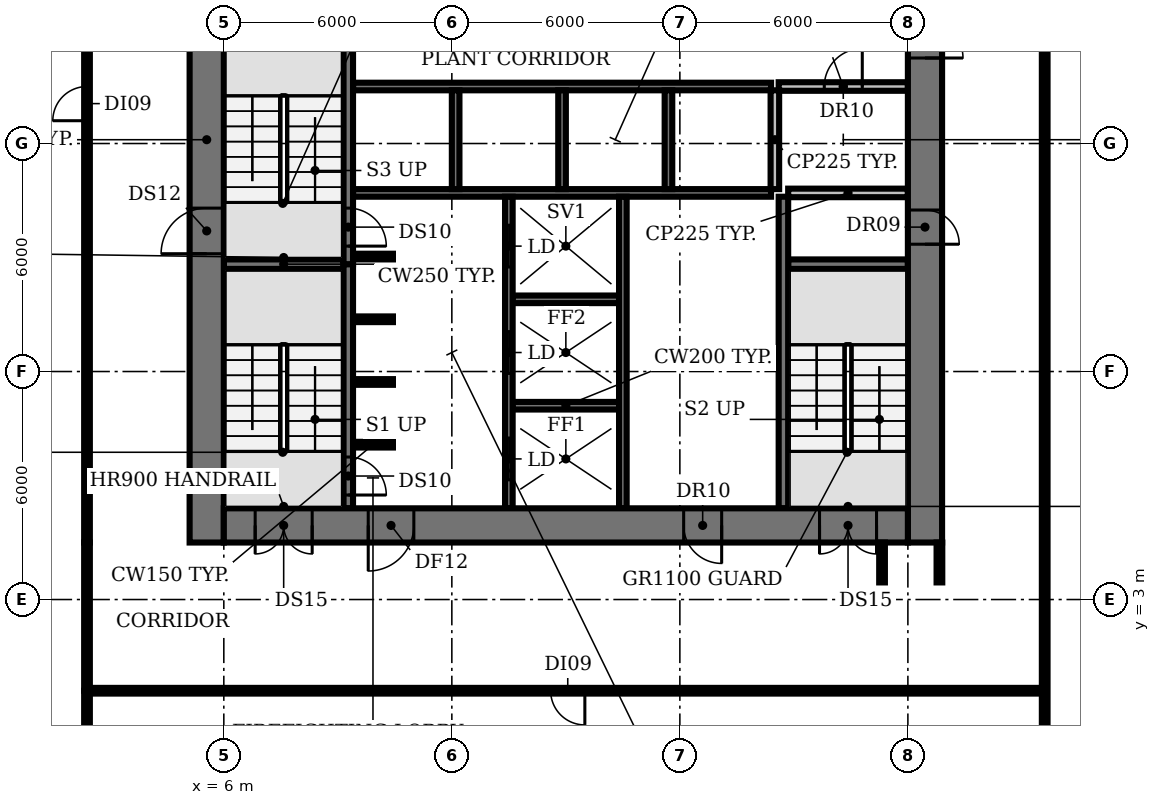
"""IFC4 building model, lengths in metres.
Left out: names, types, materials, properties, quantities, classifications, styles, units other than length and angle.
Written with IfcOpenShell. Run it as: python <this file> out.ifc"""

import sys

from ifc_helpers import new_model, si_unit, direction, frame, frame_2d, origin, place, context, subcontext, project, spatial, rectangle, extrude, element, fill, save


model = new_model("IFC4")
c1 = context("Model", 3, precision=1e-05, world=origin(), true_north=direction((0.0, 1.0)))
c2 = subcontext(c1, "Body", "Model", "MODEL_VIEW")
j1 = project(units=[si_unit("LENGTHUNIT", "METRE"), si_unit("PLANEANGLEUNIT", "RADIAN")], contexts=[c1])
p1 = place(None, origin())
s1 = spatial("IfcSite", under=j1, at=p1, CompositionType="ELEMENT")
p2 = place(p1, origin())
s2 = spatial("IfcBuilding", under=s1, at=p2, CompositionType="ELEMENT")
p3 = place(p2, frame((0.0, 0.0, -6.0)))
s3 = spatial("IfcBuildingStorey", under=s2, at=p3, CompositionType="ELEMENT", Elevation=-6.0)
p4 = place(p3, frame((9.4, 7.075, 0.0), z_axis=(0.0, 0.0, 1.0), x_axis=(1.0, 0.0, 0.0)))
e1 = element("IfcWall", 1, at=p4, inside=s3, PredefinedType="SHEAR", context=c2, shape_type="SweptSolid", body=[
    extrude(rectangle(XDim=1.05, YDim=0.15, at=frame_2d((0.525, 0.0))), origin(), (0.0, 0.0, 1.0), 5.65),
])
p5 = place(p3, frame((13.6, 8.1, 0.0), z_axis=(0.0, 0.0, 1.0), x_axis=(1.0, 0.0, 0.0)))
e2 = element("IfcWall", 2, at=p5, inside=s3, PredefinedType="SHEAR", context=c2, shape_type="SweptSolid", body=[
    extrude(rectangle(XDim=2.8, YDim=0.2, at=frame_2d((1.4, 0.0))), origin(), (0.0, 0.0, 1.0), 5.65),
])
for number, where, z_axis, x_axis in (
    (3, (9.4, 8.725, 0.0), (0.0, 0.0, 1.0), (1.0, 0.0, 0.0)),
    (4, (9.4, 10.375, 0.0), (0.0, 0.0, 1.0), (1.0, 0.0, 0.0)),
):
    element("IfcWall", number, at=place(p3, frame(where, z_axis=z_axis, x_axis=x_axis)), inside=s3, PredefinedType="SHEAR", context=c2, shape_type="SweptSolid", body=[
        extrude(rectangle(XDim=1.05, YDim=0.15, at=frame_2d((0.525, 0.0))), origin(), (0.0, 0.0, 1.0), 5.65),
    ])
p6 = place(p3, frame((13.6, 10.9, 0.0), z_axis=(0.0, 0.0, 1.0), x_axis=(1.0, 0.0, 0.0)))
e5 = element("IfcWall", 5, at=p6, inside=s3, PredefinedType="SHEAR", context=c2, shape_type="SweptSolid", body=[
    extrude(rectangle(XDim=2.8, YDim=0.2, at=frame_2d((1.4, 0.0))), origin(), (0.0, 0.0, 1.0), 5.65),
])
for number, where, z_axis, x_axis in (
    (6, (6.0, 11.825, 0.0), (0.0, 0.0, 1.0), (1.0, 0.0, 0.0)),
    (7, (20.85, 11.825, 0.0), (0.0, 0.0, 1.0), (1.0, 0.0, 0.0)),
):
    element("IfcWall", number, at=place(p3, frame(where, z_axis=z_axis, x_axis=x_axis)), inside=s3, PredefinedType="SHEAR", context=c2, shape_type="SweptSolid", body=[
        extrude(rectangle(XDim=3.15, YDim=0.25, at=frame_2d((1.575, 0.0))), origin(), (0.0, 0.0, 1.0), 5.65),
    ])
p7 = place(p3, frame((9.4, 12.025, 0.0), z_axis=(0.0, 0.0, 1.0), x_axis=(1.0, 0.0, 0.0)))
e8 = element("IfcWall", 8, at=p7, inside=s3, PredefinedType="SHEAR", context=c2, shape_type="SweptSolid", body=[
    extrude(rectangle(XDim=1.05, YDim=0.15, at=frame_2d((0.525, 0.0))), origin(), (0.0, 0.0, 1.0), 5.65),
])
p8 = place(p3, frame((9.4, 13.7, 0.0), z_axis=(0.0, 0.0, 1.0), x_axis=(1.0, 0.0, 0.0)))
e9 = element("IfcWall", 9, at=p8, inside=s3, PredefinedType="SHEAR", context=c2, shape_type="SweptSolid", body=[
    extrude(rectangle(XDim=11.0, YDim=0.2, at=frame_2d((5.5, 0.0))), origin(), (0.0, 0.0, 1.0), 5.65),
])
p9 = place(p3, frame((20.85, 13.7, 0.0), z_axis=(0.0, 0.0, 1.0), x_axis=(1.0, 0.0, 0.0)))
e10 = element("IfcWall", 10, at=p9, inside=s3, PredefinedType="PARTITIONING", context=c2, shape_type="SweptSolid", body=[
    extrude(rectangle(XDim=3.15, YDim=0.225, at=frame_2d((1.575, 0.0))), origin(), (0.0, 0.0, 1.0), 5.65),
])
p10 = place(p3, frame((9.4, 16.5, 0.0), z_axis=(0.0, 0.0, 1.0), x_axis=(1.0, 0.0, 0.0)))
e11 = element("IfcWall", 11, at=p10, inside=s3, PredefinedType="SHEAR", context=c2, shape_type="SweptSolid", body=[
    extrude(rectangle(XDim=11.0, YDim=0.2, at=frame_2d((5.5, 0.0))), origin(), (0.0, 0.0, 1.0), 5.65),
])
p11 = place(p3, frame((20.6, 16.5, 0.0), z_axis=(0.0, 0.0, 1.0), x_axis=(1.0, 0.0, 0.0)))
e12 = element("IfcWall", 12, at=p11, inside=s3, PredefinedType="PARTITIONING", context=c2, shape_type="SweptSolid", body=[
    extrude(rectangle(XDim=3.4, YDim=0.225, at=frame_2d((1.7, 0.0))), origin(), (0.0, 0.0, 1.0), 5.65),
])
p12 = place(p11, frame((1.2, 0.0, 0.0)))
e13 = element("IfcOpeningElement", 13, at=p12, cuts=e12, PredefinedType="OPENING", context=c2, shape_type="SweptSolid", body=[
    extrude(rectangle(XDim=1.0, YDim=2.1, at=frame_2d((0.5, 1.05))), frame((0.0, 0.123, 0.0), z_axis=(0.0, -1.0, 0.0), x_axis=(1.0, 0.0, 0.0)), (0.0, 0.0, 1.0), 0.245),
])
p13 = place(p3, frame((9.275, 11.825, 0.0), z_axis=(0.0, 0.0, 1.0), x_axis=(0.0, -1.0, 0.0)))
e14 = element("IfcWall", 14, at=p13, inside=s3, PredefinedType="SHEAR", context=c2, shape_type="SweptSolid", body=[
    extrude(rectangle(XDim=6.425, YDim=0.25, at=frame_2d((3.212, 0.0))), origin(), (0.0, 0.0, 1.0), 5.65),
])
p14 = place(p13, frame((5.075, 0.0, 0.0)))
e15 = element("IfcOpeningElement", 15, at=p14, cuts=e14, PredefinedType="OPENING", context=c2, shape_type="SweptSolid", body=[
    extrude(rectangle(XDim=1.0, YDim=2.1, at=frame_2d((0.5, 1.05))), frame((0.0, 0.135, 0.0), z_axis=(0.0, -1.0, 0.0), x_axis=(1.0, 0.0, 0.0)), (0.0, 0.0, 1.0), 0.27),
])
p15 = place(p3, frame((9.275, 18.375, 0.0), z_axis=(0.0, 0.0, 1.0), x_axis=(0.0, -1.0, 0.0)))
e16 = element("IfcWall", 16, at=p15, inside=s3, PredefinedType="SHEAR", context=c2, shape_type="SweptSolid", body=[
    extrude(rectangle(XDim=6.55, YDim=0.25, at=frame_2d((3.275, 0.0))), origin(), (0.0, 0.0, 1.0), 5.65),
])
p16 = place(p15, frame((5.075, 0.0, 0.0)))
e17 = element("IfcOpeningElement", 17, at=p16, cuts=e16, PredefinedType="OPENING", context=c2, shape_type="SweptSolid", body=[
    extrude(rectangle(XDim=1.0, YDim=2.1, at=frame_2d((0.5, 1.05))), frame((0.0, 0.135, 0.0), z_axis=(0.0, -1.0, 0.0), x_axis=(1.0, 0.0, 0.0)), (0.0, 0.0, 1.0), 0.27),
])
p17 = place(p3, frame((12.1, 13.8, 0.0), z_axis=(0.0, 0.0, 1.0), x_axis=(0.0, 1.0, 0.0)))
e18 = element("IfcWall", 18, at=p17, inside=s3, PredefinedType="SHEAR", context=c2, shape_type="SweptSolid", body=[
    extrude(rectangle(XDim=2.6, YDim=0.2, at=frame_2d((1.3, 0.0))), origin(), (0.0, 0.0, 1.0), 5.65),
])
p18 = place(p3, frame((13.5, 5.4, 0.0), z_axis=(0.0, 0.0, 1.0), x_axis=(0.0, 1.0, 0.0)))
e19 = element("IfcWall", 19, at=p18, inside=s3, PredefinedType="SHEAR", context=c2, shape_type="SweptSolid", body=[
    extrude(rectangle(XDim=8.2, YDim=0.2, at=frame_2d((4.1, 0.0))), origin(), (0.0, 0.0, 1.0), 5.65),
])
p19 = place(p18, frame((0.75, 0.0, 0.0)))
e20 = element("IfcOpeningElement", 20, at=p19, cuts=e19, PredefinedType="OPENING", context=c2, shape_type="SweptSolid", body=[
    extrude(rectangle(XDim=1.1, YDim=2.1, at=frame_2d((0.55, 1.05))), frame((0.0, 0.11, 0.0), z_axis=(0.0, -1.0, 0.0), x_axis=(1.0, 0.0, 0.0)), (0.0, 0.0, 1.0), 0.22),
])
p20 = place(p18, frame((3.55, 0.0, 0.0)))
e21 = element("IfcOpeningElement", 21, at=p20, cuts=e19, PredefinedType="OPENING", context=c2, shape_type="SweptSolid", body=[
    extrude(rectangle(XDim=1.1, YDim=2.1, at=frame_2d((0.55, 1.05))), frame((0.0, 0.11, 0.0), z_axis=(0.0, -1.0, 0.0), x_axis=(1.0, 0.0, 0.0)), (0.0, 0.0, 1.0), 0.22),
])
p21 = place(p18, frame((6.35, 0.0, 0.0)))
e22 = element("IfcOpeningElement", 22, at=p21, cuts=e19, PredefinedType="OPENING", context=c2, shape_type="SweptSolid", body=[
    extrude(rectangle(XDim=1.1, YDim=2.1, at=frame_2d((0.55, 1.05))), frame((0.0, 0.11, 0.0), z_axis=(0.0, -1.0, 0.0), x_axis=(1.0, 0.0, 0.0)), (0.0, 0.0, 1.0), 0.22),
])
p22 = place(p3, frame((14.9, 13.8, 0.0), z_axis=(0.0, 0.0, 1.0), x_axis=(0.0, 1.0, 0.0)))
e23 = element("IfcWall", 23, at=p22, inside=s3, PredefinedType="SHEAR", context=c2, shape_type="SweptSolid", body=[
    extrude(rectangle(XDim=2.6, YDim=0.2, at=frame_2d((1.3, 0.0))), origin(), (0.0, 0.0, 1.0), 5.65),
])
p23 = place(p3, frame((16.5, 5.4, 0.0), z_axis=(0.0, 0.0, 1.0), x_axis=(0.0, 1.0, 0.0)))
e24 = element("IfcWall", 24, at=p23, inside=s3, PredefinedType="SHEAR", context=c2, shape_type="SweptSolid", body=[
    extrude(rectangle(XDim=8.2, YDim=0.2, at=frame_2d((4.1, 0.0))), origin(), (0.0, 0.0, 1.0), 5.65),
])
p24 = place(p3, frame((17.7, 13.8, 0.0), z_axis=(0.0, 0.0, 1.0), x_axis=(0.0, 1.0, 0.0)))
e25 = element("IfcWall", 25, at=p24, inside=s3, PredefinedType="SHEAR", context=c2, shape_type="SweptSolid", body=[
    extrude(rectangle(XDim=2.6, YDim=0.2, at=frame_2d((1.3, 0.0))), origin(), (0.0, 0.0, 1.0), 5.65),
])
p25 = place(p3, frame((20.5, 13.8, 0.0), z_axis=(0.0, 0.0, 1.0), x_axis=(0.0, 1.0, 0.0)))
e26 = element("IfcWall", 26, at=p25, inside=s3, PredefinedType="PARTITIONING", context=c2, shape_type="SweptSolid", body=[
    extrude(rectangle(XDim=2.6, YDim=0.225, at=frame_2d((1.3, 0.0))), origin(), (0.0, 0.0, 1.0), 5.65),
])
p26 = place(p3, frame((20.725, 5.4, 0.0), z_axis=(0.0, 0.0, 1.0), x_axis=(0.0, 1.0, 0.0)))
e27 = element("IfcWall", 27, at=p26, inside=s3, PredefinedType="SHEAR", context=c2, shape_type="SweptSolid", body=[
    extrude(rectangle(XDim=8.2, YDim=0.25, at=frame_2d((4.1, 0.0))), origin(), (0.0, 0.0, 1.0), 5.65),
])
p27 = place(p3, frame((5.55, 4.5, 0.0), z_axis=(0.0, 0.0, 1.0), x_axis=(0.0, 1.0, 0.0)))
e28 = element("IfcWall", 28, at=p27, inside=s3, PredefinedType="SHEAR", context=c2, shape_type="SweptSolid", body=[
    extrude(rectangle(XDim=21.2, YDim=0.9, at=frame_2d((10.6, 0.0))), origin(), (0.0, 0.0, 1.0), 5.65),
])
p28 = place(p27, frame((7.6, 0.0, 0.0)))
e29 = element("IfcOpeningElement", 29, at=p28, cuts=e28, PredefinedType="OPENING", context=c2, shape_type="SweptSolid", body=[
    extrude(rectangle(XDim=1.2, YDim=2.1, at=frame_2d((0.6, 1.05))), frame((0.0, 0.46, 0.0), z_axis=(0.0, -1.0, 0.0), x_axis=(1.0, 0.0, 0.0)), (0.0, 0.0, 1.0), 0.92),
])
p29 = place(p27, frame((14.15, 0.0, 0.0)))
e30 = element("IfcOpeningElement", 30, at=p29, cuts=e28, PredefinedType="OPENING", context=c2, shape_type="SweptSolid", body=[
    extrude(rectangle(XDim=1.2, YDim=2.1, at=frame_2d((0.6, 1.05))), frame((0.0, 0.46, 0.0), z_axis=(0.0, -1.0, 0.0), x_axis=(1.0, 0.0, 0.0)), (0.0, 0.0, 1.0), 0.92),
])
p30 = place(p3, frame((24.45, 25.7, 0.0), z_axis=(0.0, 0.0, 1.0), x_axis=(0.0, -1.0, 0.0)))
e31 = element("IfcWall", 31, at=p30, inside=s3, PredefinedType="SHEAR", context=c2, shape_type="SweptSolid", body=[
    extrude(rectangle(XDim=21.2, YDim=0.9, at=frame_2d((10.6, 0.0))), origin(), (0.0, 0.0, 1.0), 5.65),
])
p31 = place(p30, frame((12.45, 0.0, 0.0)))
e32 = element("IfcOpeningElement", 32, at=p31, cuts=e31, PredefinedType="OPENING", context=c2, shape_type="SweptSolid", body=[
    extrude(rectangle(XDim=0.9, YDim=2.1, at=frame_2d((0.45, 1.05))), frame((0.0, 0.46, 0.0), z_axis=(0.0, -1.0, 0.0), x_axis=(1.0, 0.0, 0.0)), (0.0, 0.0, 1.0), 0.92),
])
p32 = place(p30, frame((6.45, 0.0, 0.0)))
e33 = element("IfcOpeningElement", 33, at=p32, cuts=e31, PredefinedType="OPENING", context=c2, shape_type="SweptSolid", body=[
    extrude(rectangle(XDim=2.0, YDim=2.1, at=frame_2d((1.0, 1.05))), frame((0.0, 0.46, 0.0), z_axis=(0.0, -1.0, 0.0), x_axis=(1.0, 0.0, 0.0)), (0.0, 0.0, 1.0), 0.92),
])
p33 = place(p3, frame((24.0, 4.95, 0.0), z_axis=(0.0, 0.0, 1.0), x_axis=(-1.0, 0.0, 0.0)))
e34 = element("IfcWall", 34, at=p33, inside=s3, PredefinedType="SHEAR", context=c2, shape_type="SweptSolid", body=[
    extrude(rectangle(XDim=18.0, YDim=0.9, at=frame_2d((9.0, 0.0))), origin(), (0.0, 0.0, 1.0), 5.65),
])
p34 = place(p33, frame((15.675, 0.0, 0.0)))
e35 = element("IfcOpeningElement", 35, at=p34, cuts=e34, PredefinedType="OPENING", context=c2, shape_type="SweptSolid", body=[
    extrude(rectangle(XDim=1.5, YDim=2.1, at=frame_2d((0.75, 1.05))), frame((0.0, 0.46, 0.0), z_axis=(0.0, -1.0, 0.0), x_axis=(1.0, 0.0, 0.0)), (0.0, 0.0, 1.0), 0.92),
])
p35 = place(p33, frame((0.825, 0.0, 0.0)))
e36 = element("IfcOpeningElement", 36, at=p35, cuts=e34, PredefinedType="OPENING", context=c2, shape_type="SweptSolid", body=[
    extrude(rectangle(XDim=1.5, YDim=2.1, at=frame_2d((0.75, 1.05))), frame((0.0, 0.46, 0.0), z_axis=(0.0, -1.0, 0.0), x_axis=(1.0, 0.0, 0.0)), (0.0, 0.0, 1.0), 0.92),
])
p36 = place(p33, frame((13.0, 0.0, 0.0)))
e37 = element("IfcOpeningElement", 37, at=p36, cuts=e34, PredefinedType="OPENING", context=c2, shape_type="SweptSolid", body=[
    extrude(rectangle(XDim=1.2, YDim=2.1, at=frame_2d((0.6, 1.05))), frame((0.0, 0.46, 0.0), z_axis=(0.0, -1.0, 0.0), x_axis=(1.0, 0.0, 0.0)), (0.0, 0.0, 1.0), 0.92),
])
p37 = place(p33, frame((4.9, 0.0, 0.0)))
e38 = element("IfcOpeningElement", 38, at=p37, cuts=e34, PredefinedType="OPENING", context=c2, shape_type="SweptSolid", body=[
    extrude(rectangle(XDim=1.0, YDim=2.1, at=frame_2d((0.5, 1.05))), frame((0.0, 0.46, 0.0), z_axis=(0.0, -1.0, 0.0), x_axis=(1.0, 0.0, 0.0)), (0.0, 0.0, 1.0), 0.92),
])
p38 = place(p3, frame((2.4, -10.09, 0.0), z_axis=(0.0, 0.0, 1.0), x_axis=(0.0, 1.0, 0.0)))
e39 = element("IfcWall", 39, at=p38, inside=s3, PredefinedType="PARTITIONING", context=c2, shape_type="SweptSolid", body=[
    extrude(rectangle(XDim=10.69, YDim=0.15, at=frame_2d((5.345, 0.0))), origin(), (0.0, 0.0, 1.0), 4.7),
])
p39 = place(p3, frame((2.4, 0.6, 0.0), z_axis=(0.0, 0.0, 1.0), x_axis=(0.0, 1.0, 0.0)))
e40 = element("IfcWall", 40, at=p39, inside=s3, PredefinedType="PARTITIONING", context=c2, shape_type="SweptSolid", body=[
    extrude(rectangle(XDim=3.9, YDim=0.15, at=frame_2d((1.95, 0.0))), origin(), (0.0, 0.0, 1.0), 4.7),
])
p40 = place(p3, frame((2.4, 4.5, 0.0), z_axis=(0.0, 0.0, 1.0), x_axis=(0.0, 1.0, 0.0)))
e41 = element("IfcWall", 41, at=p40, inside=s3, PredefinedType="PARTITIONING", context=c2, shape_type="SweptSolid", body=[
    extrude(rectangle(XDim=21.2, YDim=0.15, at=frame_2d((10.6, 0.0))), origin(), (0.0, 0.0, 1.0), 4.7),
])
p41 = place(p40, frame((11.1, 0.0, 0.0)))
e42 = element("IfcOpeningElement", 42, at=p41, cuts=e41, PredefinedType="OPENING", context=c2, shape_type="SweptSolid", body=[
    extrude(rectangle(XDim=0.9, YDim=2.1, at=frame_2d((0.45, 1.05))), frame((0.0, 0.085, 0.0), z_axis=(0.0, -1.0, 0.0), x_axis=(1.0, 0.0, 0.0)), (0.0, 0.0, 1.0), 0.17),
])
for number, where, z_axis, x_axis in (
    (43, (23.32, 3.45, 0.0), (0.0, 0.0, 1.0), (0.0, 1.0, 0.0)),
    (44, (24.83, 3.45, 0.0), (0.0, 0.0, 1.0), (0.0, 1.0, 0.0)),
):
    element("IfcWall", number, at=place(p3, frame(where, z_axis=z_axis, x_axis=x_axis)), inside=s3, PredefinedType="PARTITIONING", context=c2, shape_type="SweptSolid", body=[
        extrude(rectangle(XDim=1.05, YDim=0.15, at=frame_2d((0.525, 0.0))), origin(), (0.0, 0.0, 1.0), 4.7),
    ])
p42 = place(p3, frame((27.6, -10.09, 0.0), z_axis=(0.0, 0.0, 1.0), x_axis=(0.0, 1.0, 0.0)))
e45 = element("IfcWall", 45, at=p42, inside=s3, PredefinedType="PARTITIONING", context=c2, shape_type="SweptSolid", body=[
    extrude(rectangle(XDim=32.34, YDim=0.15, at=frame_2d((16.17, 0.0))), origin(), (0.0, 0.0, 1.0), 4.7),
])
p43 = place(p3, frame((27.6, 0.6, 0.0), z_axis=(0.0, 0.0, 1.0), x_axis=(-1.0, 0.0, 0.0)))
e46 = element("IfcWall", 46, at=p43, inside=s3, PredefinedType="PARTITIONING", context=c2, shape_type="SweptSolid", body=[
    extrude(rectangle(XDim=25.2, YDim=0.15, at=frame_2d((12.6, 0.0))), origin(), (0.0, 0.0, 1.0), 4.7),
])
p44 = place(p43, frame((12.1, 0.0, 0.0)))
e47 = element("IfcOpeningElement", 47, at=p44, cuts=e46, PredefinedType="OPENING", context=c2, shape_type="SweptSolid", body=[
    extrude(rectangle(XDim=0.9, YDim=2.1, at=frame_2d((0.45, 1.05))), frame((0.0, 0.085, 0.0), z_axis=(0.0, -1.0, 0.0), x_axis=(1.0, 0.0, 0.0)), (0.0, 0.0, 1.0), 0.17),
])
p45 = place(p12, origin())
e48 = element("IfcDoor", 48, at=p45, inside=s3, OperationType="SINGLE_SWING_RIGHT", PredefinedType="DOOR", context=c2, shape_type="SweptSolid", body=[
    extrude(rectangle(XDim=1.0, YDim=2.1, at=frame_2d((0.5, 1.05))), frame((0.0, 0.025, 0.0), z_axis=(0.0, -1.0, 0.0), x_axis=(1.0, 0.0, 0.0)), (0.0, 0.0, 1.0), 0.05),
])
fill(e13, e48)
p46 = place(p14, origin())
e49 = element("IfcDoor", 49, at=p46, inside=s3, OperationType="SINGLE_SWING_RIGHT", PredefinedType="DOOR", context=c2, shape_type="SweptSolid", body=[
    extrude(rectangle(XDim=1.0, YDim=2.1, at=frame_2d((0.5, 1.05))), frame((0.0, 0.025, 0.0), z_axis=(0.0, -1.0, 0.0), x_axis=(1.0, 0.0, 0.0)), (0.0, 0.0, 1.0), 0.05),
])
fill(e15, e49)
p47 = place(p16, origin())
e50 = element("IfcDoor", 50, at=p47, inside=s3, OperationType="SINGLE_SWING_RIGHT", PredefinedType="DOOR", context=c2, shape_type="SweptSolid", body=[
    extrude(rectangle(XDim=1.0, YDim=2.1, at=frame_2d((0.5, 1.05))), frame((0.0, 0.025, 0.0), z_axis=(0.0, -1.0, 0.0), x_axis=(1.0, 0.0, 0.0)), (0.0, 0.0, 1.0), 0.05),
])
fill(e17, e50)
p48 = place(p19, origin())
e51 = element("IfcDoor", 51, at=p48, inside=s3, OperationType="DOUBLE_DOOR_SLIDING", PredefinedType="DOOR", context=c2, shape_type="SweptSolid", body=[
    extrude(rectangle(XDim=1.1, YDim=2.1, at=frame_2d((0.55, 1.05))), frame((0.0, 0.025, 0.0), z_axis=(0.0, -1.0, 0.0), x_axis=(1.0, 0.0, 0.0)), (0.0, 0.0, 1.0), 0.05),
])
fill(e20, e51)
p49 = place(p20, origin())
e52 = element("IfcDoor", 52, at=p49, inside=s3, OperationType="DOUBLE_DOOR_SLIDING", PredefinedType="DOOR", context=c2, shape_type="SweptSolid", body=[
    extrude(rectangle(XDim=1.1, YDim=2.1, at=frame_2d((0.55, 1.05))), frame((0.0, 0.025, 0.0), z_axis=(0.0, -1.0, 0.0), x_axis=(1.0, 0.0, 0.0)), (0.0, 0.0, 1.0), 0.05),
])
fill(e21, e52)
p50 = place(p21, origin())
e53 = element("IfcDoor", 53, at=p50, inside=s3, OperationType="DOUBLE_DOOR_SLIDING", PredefinedType="DOOR", context=c2, shape_type="SweptSolid", body=[
    extrude(rectangle(XDim=1.1, YDim=2.1, at=frame_2d((0.55, 1.05))), frame((0.0, 0.025, 0.0), z_axis=(0.0, -1.0, 0.0), x_axis=(1.0, 0.0, 0.0)), (0.0, 0.0, 1.0), 0.05),
])
fill(e22, e53)
p51 = place(p28, origin())
e54 = element("IfcDoor", 54, at=p51, inside=s3, OperationType="SINGLE_SWING_LEFT", PredefinedType="DOOR", context=c2, shape_type="SweptSolid", body=[
    extrude(rectangle(XDim=1.2, YDim=2.1, at=frame_2d((0.6, 1.05))), frame((0.0, 0.025, 0.0), z_axis=(0.0, -1.0, 0.0), x_axis=(1.0, 0.0, 0.0)), (0.0, 0.0, 1.0), 0.05),
])
fill(e29, e54)
p52 = place(p31, origin())
e55 = element("IfcDoor", 55, at=p52, inside=s3, OperationType="SINGLE_SWING_RIGHT", PredefinedType="DOOR", context=c2, shape_type="SweptSolid", body=[
    extrude(rectangle(XDim=0.9, YDim=2.1, at=frame_2d((0.45, 1.05))), frame((0.0, -0.39, 0.0), z_axis=(0.0, -1.0, 0.0), x_axis=(1.0, 0.0, 0.0)), (0.0, 0.0, 1.0), 0.05),
])
fill(e32, e55)
p53 = place(p32, origin())
e56 = element("IfcDoor", 56, at=p53, inside=s3, OperationType="DOUBLE_DOOR_SINGLE_SWING", PredefinedType="DOOR", context=c2, shape_type="SweptSolid", body=[
    extrude(rectangle(XDim=2.0, YDim=2.1, at=frame_2d((1.0, 1.05))), frame((0.0, 0.025, 0.0), z_axis=(0.0, -1.0, 0.0), x_axis=(1.0, 0.0, 0.0)), (0.0, 0.0, 1.0), 0.05),
])
fill(e33, e56)
p54 = place(p34, origin())
e57 = element("IfcDoor", 57, at=p54, inside=s3, OperationType="DOUBLE_DOOR_SINGLE_SWING", PredefinedType="DOOR", context=c2, shape_type="SweptSolid", body=[
    extrude(rectangle(XDim=1.5, YDim=2.1, at=frame_2d((0.75, 1.05))), frame((0.0, 0.025, 0.0), z_axis=(0.0, -1.0, 0.0), x_axis=(1.0, 0.0, 0.0)), (0.0, 0.0, 1.0), 0.05),
])
fill(e35, e57)
p55 = place(p35, origin())
e58 = element("IfcDoor", 58, at=p55, inside=s3, OperationType="DOUBLE_DOOR_SINGLE_SWING", PredefinedType="DOOR", context=c2, shape_type="SweptSolid", body=[
    extrude(rectangle(XDim=1.5, YDim=2.1, at=frame_2d((0.75, 1.05))), frame((0.0, 0.025, 0.0), z_axis=(0.0, -1.0, 0.0), x_axis=(1.0, 0.0, 0.0)), (0.0, 0.0, 1.0), 0.05),
])
fill(e36, e58)
p56 = place(p36, origin())
e59 = element("IfcDoor", 59, at=p56, inside=s3, OperationType="SINGLE_SWING_RIGHT", PredefinedType="DOOR", context=c2, shape_type="SweptSolid", body=[
    extrude(rectangle(XDim=1.2, YDim=2.1, at=frame_2d((0.6, 1.05))), frame((0.0, 0.025, 0.0), z_axis=(0.0, -1.0, 0.0), x_axis=(1.0, 0.0, 0.0)), (0.0, 0.0, 1.0), 0.05),
])
fill(e37, e59)
p57 = place(p37, origin())
e60 = element("IfcDoor", 60, at=p57, inside=s3, OperationType="SINGLE_SWING_LEFT", PredefinedType="DOOR", context=c2, shape_type="SweptSolid", body=[
    extrude(rectangle(XDim=1.0, YDim=2.1, at=frame_2d((0.5, 1.05))), frame((0.0, -0.39, 0.0), z_axis=(0.0, -1.0, 0.0), x_axis=(1.0, 0.0, 0.0)), (0.0, 0.0, 1.0), 0.05),
])
fill(e38, e60)
p58 = place(p41, origin())
e61 = element("IfcDoor", 61, at=p58, inside=s3, OperationType="SINGLE_SWING_LEFT", PredefinedType="DOOR", context=c2, shape_type="SweptSolid", body=[
    extrude(rectangle(XDim=0.9, YDim=2.1, at=frame_2d((0.45, 1.05))), frame((0.0, 0.025, 0.0), z_axis=(0.0, -1.0, 0.0), x_axis=(1.0, 0.0, 0.0)), (0.0, 0.0, 1.0), 0.05),
])
fill(e42, e61)
p59 = place(p44, origin())
e62 = element("IfcDoor", 62, at=p59, inside=s3, OperationType="SINGLE_SWING_LEFT", PredefinedType="DOOR", context=c2, shape_type="SweptSolid", body=[
    extrude(rectangle(XDim=0.9, YDim=2.1, at=frame_2d((0.45, 1.05))), frame((0.0, 0.025, 0.0), z_axis=(0.0, -1.0, 0.0), x_axis=(1.0, 0.0, 0.0)), (0.0, 0.0, 1.0), 0.05),
])
fill(e47, e62)
save(model, sys.argv[1])
